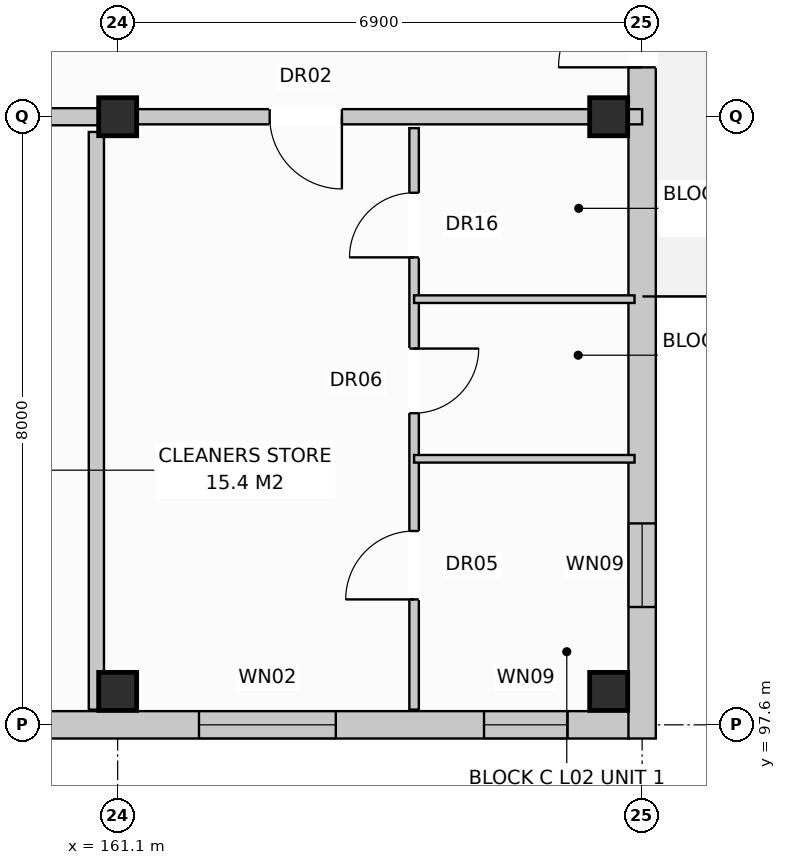
"""IFC4 building model, lengths in metres.
Left out: names, types, materials, properties, quantities, classifications, styles, units other than length and angle.
Written with IfcOpenShell. Run it as: python <this file> out.ifc"""

import sys

from ifc_helpers import new_model, si_unit, direction, frame, frame_2d, origin, origin_with_axes, origin_2d, place, context, subcontext, project, spatial, rectangle, extrude, element, fill, save


model = new_model("IFC4")
c1 = context("Model", 3, precision=1e-05, world=origin(), true_north=direction((0.0, 1.0)))
c2 = subcontext(c1, "Body", "Model", "MODEL_VIEW")
j1 = project(units=[si_unit("LENGTHUNIT", "METRE"), si_unit("PLANEANGLEUNIT", "RADIAN")], contexts=[c1])
p1 = place(None, origin())
s1 = spatial("IfcSite", under=j1, at=p1, CompositionType="ELEMENT")
p2 = place(p1, origin())
s2 = spatial("IfcBuilding", under=s1, at=p2, CompositionType="ELEMENT")
p3 = place(p2, frame((0.0, 0.0, 8.0)))
s3 = spatial("IfcBuildingStorey", under=s2, at=p3, CompositionType="ELEMENT", Elevation=8.0)
for number, where, z_axis, x_axis in (
    (1, (161.1, 98.04, 0.0), (0.0, 0.0, 1.0), (1.0, 0.0, 0.0)),
    (2, (161.1, 105.6, 0.0), (0.0, 0.0, 1.0), (1.0, 0.0, 0.0)),
    (3, (167.56, 98.04, 0.0), (0.0, 0.0, 1.0), (1.0, 0.0, 0.0)),
    (4, (167.56, 105.6, 0.0), (0.0, 0.0, 1.0), (1.0, 0.0, 0.0)),
):
    element("IfcColumn", number, at=place(p3, frame(where, z_axis=z_axis, x_axis=x_axis)), inside=s3, PredefinedType="COLUMN", context=c2, shape_type="SweptSolid", body=[
        extrude(rectangle(XDim=0.5, YDim=0.5, at=origin_2d()), origin(), (0.0, 0.0, 1.0), 3.2),
    ])
p4 = place(p3, frame((151.05, 97.6, 0.0), z_axis=(0.0, 0.0, 1.0), x_axis=(1.0, 0.0, 0.0)))
e5 = element("IfcWall", 5, at=p4, inside=s3, PredefinedType="STANDARD", context=c2, shape_type="SweptSolid", body=[
    extrude(rectangle(XDim=16.78, YDim=0.36, at=frame_2d((8.39, 0.0))), origin(), (0.0, 0.0, 1.0), 2.94),
])
p5 = place(p4, frame((11.12, 0.0, 0.8)))
e6 = element("IfcOpeningElement", 6, at=p5, cuts=e5, PredefinedType="OPENING", context=c2, shape_type="SweptSolid", body=[
    extrude(rectangle(XDim=1.8, YDim=1.7, at=frame_2d((0.9, 0.85))), frame((0.0, 0.192, 0.0), z_axis=(0.0, -1.0, 0.0), x_axis=(1.0, 0.0, 0.0)), (0.0, 0.0, 1.0), 0.384),
])
p6 = place(p4, frame((14.87, 0.0, 0.72)))
e7 = element("IfcOpeningElement", 7, at=p6, cuts=e5, PredefinedType="OPENING", context=c2, shape_type="SweptSolid", body=[
    extrude(rectangle(XDim=1.1, YDim=1.5, at=frame_2d((0.55, 0.75))), frame((0.0, 0.192, 0.0), z_axis=(0.0, -1.0, 0.0), x_axis=(1.0, 0.0, 0.0)), (0.0, 0.0, 1.0), 0.384),
])
p7 = place(p3, frame((168.0, 97.42, 0.0), z_axis=(0.0, 0.0, 1.0), x_axis=(0.0, 1.0, 0.0)))
e8 = element("IfcWall", 8, at=p7, inside=s3, PredefinedType="STANDARD", context=c2, shape_type="SweptSolid", body=[
    extrude(rectangle(XDim=18.76, YDim=0.36, at=frame_2d((9.38, 0.0))), origin(), (0.0, 0.0, 1.0), 2.94),
])
p8 = place(p7, frame((8.83, 0.0, 0.0)))
e9 = element("IfcOpeningElement", 9, at=p8, cuts=e8, PredefinedType="OPENING", context=c2, shape_type="SweptSolid", body=[
    extrude(rectangle(XDim=1.1, YDim=2.1, at=frame_2d((0.55, 1.05))), frame((0.0, 0.192, 0.0), z_axis=(0.0, -1.0, 0.0), x_axis=(1.0, 0.0, 0.0)), (0.0, 0.0, 1.0), 0.384),
])
p9 = place(p7, frame((1.73, 0.0, 0.72)))
e10 = element("IfcOpeningElement", 10, at=p9, cuts=e8, PredefinedType="OPENING", context=c2, shape_type="SweptSolid", body=[
    extrude(rectangle(XDim=1.1, YDim=1.5, at=frame_2d((0.55, 0.75))), frame((0.0, 0.192, 0.0), z_axis=(0.0, -1.0, 0.0), x_axis=(1.0, 0.0, 0.0)), (0.0, 0.0, 1.0), 0.384),
])
p10 = place(p7, frame((15.93, 0.0, 0.72)))
e11 = element("IfcOpeningElement", 11, at=p10, cuts=e8, PredefinedType="OPENING", context=c2, shape_type="SweptSolid", body=[
    extrude(rectangle(XDim=1.1, YDim=1.5, at=frame_2d((0.55, 0.75))), frame((0.0, 0.192, 0.0), z_axis=(0.0, -1.0, 0.0), x_axis=(1.0, 0.0, 0.0)), (0.0, 0.0, 1.0), 0.384),
])
p11 = place(p3, frame((160.82, 97.8, 0.0), z_axis=(0.0, 0.0, 1.0), x_axis=(0.0, 1.0, 0.0)))
e12 = element("IfcWall", 12, at=p11, inside=s3, PredefinedType="PARTITIONING", context=c2, shape_type="SweptSolid", body=[
    extrude(rectangle(XDim=7.6, YDim=0.2, at=frame_2d((3.8, 0.0))), origin(), (0.0, 0.0, 1.0), 2.38),
])
p12 = place(p3, frame((151.2, 105.6, 0.0), z_axis=(0.0, 0.0, 1.0), x_axis=(1.0, 0.0, 0.0)))
e13 = element("IfcWall", 13, at=p12, inside=s3, PredefinedType="PARTITIONING", context=c2, shape_type="SweptSolid", body=[
    extrude(rectangle(XDim=9.9, YDim=0.225, at=frame_2d((4.95, 0.0))), origin(), (0.0, 0.0, 1.0), 2.38),
])
p13 = place(p12, frame((0.475, 0.0, 0.0)))
e14 = element("IfcOpeningElement", 14, at=p13, cuts=e13, PredefinedType="OPENING", context=c2, shape_type="SweptSolid", body=[
    extrude(rectangle(XDim=1.1, YDim=2.15, at=frame_2d((0.55, 1.075))), frame((0.0, 0.125, 0.0), z_axis=(0.0, -1.0, 0.0), x_axis=(1.0, 0.0, 0.0)), (0.0, 0.0, 1.0), 0.249),
])
p14 = place(p12, frame((5.75, 0.0, 0.0)))
e15 = element("IfcOpeningElement", 15, at=p14, cuts=e13, PredefinedType="OPENING", context=c2, shape_type="SweptSolid", body=[
    extrude(rectangle(XDim=0.9, YDim=2.1, at=frame_2d((0.45, 1.05))), frame((0.0, 0.125, 0.0), z_axis=(0.0, -1.0, 0.0), x_axis=(1.0, 0.0, 0.0)), (0.0, 0.0, 1.0), 0.249),
])
p15 = place(p12, frame((7.8, 0.0, 0.0)))
e16 = element("IfcOpeningElement", 16, at=p15, cuts=e13, PredefinedType="OPENING", context=c2, shape_type="SweptSolid", body=[
    extrude(rectangle(XDim=0.95, YDim=2.15, at=frame_2d((0.475, 1.075))), frame((0.0, 0.125, 0.0), z_axis=(0.0, -1.0, 0.0), x_axis=(1.0, 0.0, 0.0)), (0.0, 0.0, 1.0), 0.249),
])
p16 = place(p3, frame((161.1, 105.6, 0.0), z_axis=(0.0, 0.0, 1.0), x_axis=(1.0, 0.0, 0.0)))
e17 = element("IfcWall", 17, at=p16, inside=s3, PredefinedType="PARTITIONING", context=c2, shape_type="SweptSolid", body=[
    extrude(rectangle(XDim=6.9, YDim=0.2, at=frame_2d((3.45, 0.0))), origin(), (0.0, 0.0, 1.0), 2.38),
])
p17 = place(p16, frame((2.0, 0.0, 0.0)))
e18 = element("IfcOpeningElement", 18, at=p17, cuts=e17, PredefinedType="OPENING", context=c2, shape_type="SweptSolid", body=[
    extrude(rectangle(XDim=0.95, YDim=2.15, at=frame_2d((0.475, 1.075))), frame((0.0, 0.112, 0.0), z_axis=(0.0, -1.0, 0.0), x_axis=(1.0, 0.0, 0.0)), (0.0, 0.0, 1.0), 0.224),
])
p18 = place(p3, frame((165.0, 105.45, 0.0), z_axis=(0.0, 0.0, 1.0), x_axis=(0.0, -1.0, 0.0)))
e19 = element("IfcWall", 19, at=p18, inside=s3, PredefinedType="PARTITIONING", context=c2, shape_type="SweptSolid", body=[
    extrude(rectangle(XDim=7.65, YDim=0.125, at=frame_2d((3.825, 0.0))), origin(), (0.0, 0.0, 1.0), 2.94),
])
p19 = place(p18, frame((0.85, 0.0, 0.0)))
e20 = element("IfcOpeningElement", 20, at=p19, cuts=e19, PredefinedType="OPENING", context=c2, shape_type="SweptSolid", body=[
    extrude(rectangle(XDim=0.85, YDim=2.1, at=frame_2d((0.425, 1.05))), frame((0.0, 0.074, 0.0), z_axis=(0.0, -1.0, 0.0), x_axis=(1.0, 0.0, 0.0)), (0.0, 0.0, 1.0), 0.149),
])
p20 = place(p18, frame((2.9, 0.0, 0.0)))
e21 = element("IfcOpeningElement", 21, at=p20, cuts=e19, PredefinedType="OPENING", context=c2, shape_type="SweptSolid", body=[
    extrude(rectangle(XDim=0.85, YDim=2.05, at=frame_2d((0.425, 1.025))), frame((0.0, 0.074, 0.0), z_axis=(0.0, -1.0, 0.0), x_axis=(1.0, 0.0, 0.0)), (0.0, 0.0, 1.0), 0.149),
])
p21 = place(p18, frame((5.3, 0.0, 0.0)))
e22 = element("IfcOpeningElement", 22, at=p21, cuts=e19, PredefinedType="OPENING", context=c2, shape_type="SweptSolid", body=[
    extrude(rectangle(XDim=0.9, YDim=2.1, at=frame_2d((0.45, 1.05))), frame((0.0, 0.074, 0.0), z_axis=(0.0, -1.0, 0.0), x_axis=(1.0, 0.0, 0.0)), (0.0, 0.0, 1.0), 0.149),
])
for number, where, z_axis, x_axis in (
    (23, (165.0, 103.2, 0.0), (0.0, 0.0, 1.0), (1.0, 0.0, 0.0)),
    (24, (165.0, 101.1, 0.0), (0.0, 0.0, 1.0), (1.0, 0.0, 0.0)),
):
    element("IfcWall", number, at=place(p3, frame(where, z_axis=z_axis, x_axis=x_axis)), inside=s3, PredefinedType="PARTITIONING", context=c2, shape_type="SweptSolid", body=[
        extrude(rectangle(XDim=2.9, YDim=0.1, at=frame_2d((1.45, 0.0))), origin(), (0.0, 0.0, 1.0), 2.94),
    ])
p22 = place(p5, origin_with_axes())
e25 = element("IfcWindow", 25, at=p22, inside=s3, PartitioningType="SINGLE_PANEL", PredefinedType="WINDOW", context=c2, shape_type="SweptSolid", body=[
    extrude(rectangle(XDim=1.8, YDim=1.7, at=frame_2d((0.9, 0.85))), frame((0.0, 0.03, 0.0), z_axis=(0.0, -1.0, 0.0), x_axis=(1.0, 0.0, 0.0)), (0.0, 0.0, 1.0), 0.06),
])
fill(e6, e25)
p23 = place(p6, origin_with_axes())
e26 = element("IfcWindow", 26, at=p23, inside=s3, PartitioningType="SINGLE_PANEL", PredefinedType="WINDOW", context=c2, shape_type="SweptSolid", body=[
    extrude(rectangle(XDim=1.1, YDim=1.5, at=frame_2d((0.55, 0.75))), frame((0.0, 0.03, 0.0), z_axis=(0.0, -1.0, 0.0), x_axis=(1.0, 0.0, 0.0)), (0.0, 0.0, 1.0), 0.06),
])
fill(e7, e26)
p24 = place(p8, origin_with_axes())
e27 = element("IfcDoor", 27, at=p24, inside=s3, OperationType="SINGLE_SWING_LEFT", PredefinedType="DOOR", context=c2, shape_type="SweptSolid", body=[
    extrude(rectangle(XDim=1.1, YDim=2.1, at=frame_2d((0.55, 1.05))), frame((0.0, 0.025, 0.0), z_axis=(0.0, -1.0, 0.0), x_axis=(1.0, 0.0, 0.0)), (0.0, 0.0, 1.0), 0.05),
])
fill(e9, e27)
p25 = place(p9, origin_with_axes())
e28 = element("IfcWindow", 28, at=p25, inside=s3, PartitioningType="SINGLE_PANEL", PredefinedType="WINDOW", context=c2, shape_type="SweptSolid", body=[
    extrude(rectangle(XDim=1.1, YDim=1.5, at=frame_2d((0.55, 0.75))), frame((0.0, 0.03, 0.0), z_axis=(0.0, -1.0, 0.0), x_axis=(1.0, 0.0, 0.0)), (0.0, 0.0, 1.0), 0.06),
])
fill(e10, e28)
p26 = place(p17, frame((0.95, 0.0, 0.0), z_axis=(0.0, 0.0, 1.0), x_axis=(-1.0, 0.0, 0.0)))
e29 = element("IfcDoor", 29, at=p26, inside=s3, OperationType="SINGLE_SWING_RIGHT", PredefinedType="DOOR", context=c2, shape_type="SweptSolid", body=[
    extrude(rectangle(XDim=0.95, YDim=2.15, at=frame_2d((0.475, 1.075))), frame((0.0, 0.025, 0.0), z_axis=(0.0, -1.0, 0.0), x_axis=(1.0, 0.0, 0.0)), (0.0, 0.0, 1.0), 0.05),
])
fill(e18, e29)
p27 = place(p19, frame((0.85, 0.0, 0.0), z_axis=(0.0, 0.0, 1.0), x_axis=(-1.0, 0.0, 0.0)))
e30 = element("IfcDoor", 30, at=p27, inside=s3, OperationType="SINGLE_SWING_RIGHT", PredefinedType="DOOR", context=c2, shape_type="SweptSolid", body=[
    extrude(rectangle(XDim=0.85, YDim=2.1, at=frame_2d((0.425, 1.05))), frame((0.0, 0.025, 0.0), z_axis=(0.0, -1.0, 0.0), x_axis=(1.0, 0.0, 0.0)), (0.0, 0.0, 1.0), 0.05),
])
fill(e20, e30)
p28 = place(p20, origin_with_axes())
e31 = element("IfcDoor", 31, at=p28, inside=s3, OperationType="SINGLE_SWING_LEFT", PredefinedType="DOOR", context=c2, shape_type="SweptSolid", body=[
    extrude(rectangle(XDim=0.85, YDim=2.05, at=frame_2d((0.425, 1.025))), frame((0.0, 0.025, 0.0), z_axis=(0.0, -1.0, 0.0), x_axis=(1.0, 0.0, 0.0)), (0.0, 0.0, 1.0), 0.05),
])
fill(e21, e31)
p29 = place(p21, frame((0.9, 0.0, 0.0), z_axis=(0.0, 0.0, 1.0), x_axis=(-1.0, 0.0, 0.0)))
e32 = element("IfcDoor", 32, at=p29, inside=s3, OperationType="SINGLE_SWING_RIGHT", PredefinedType="DOOR", context=c2, shape_type="SweptSolid", body=[
    extrude(rectangle(XDim=0.9, YDim=2.1, at=frame_2d((0.45, 1.05))), frame((0.0, 0.025, 0.0), z_axis=(0.0, -1.0, 0.0), x_axis=(1.0, 0.0, 0.0)), (0.0, 0.0, 1.0), 0.05),
])
fill(e22, e32)
save(model, sys.argv[1])
